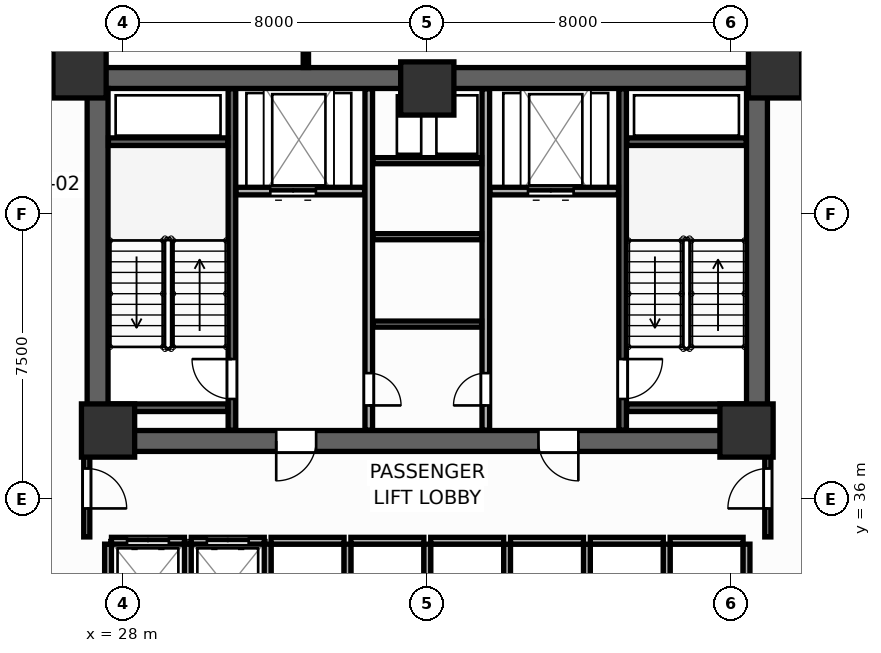
"""IFC4 building model, lengths in metres.
Left out: names, types, materials, properties, quantities, classifications, styles, units other than length and angle.
Written with IfcOpenShell. Run it as: python <this file> out.ifc"""

import sys

from ifc_helpers import new_model, si_unit, direction, frame, frame_2d, origin, origin_2d, place, context, subcontext, project, spatial, rectangle, extrude, source, transform, mapped, element, fill, save


model = new_model("IFC4")
c1 = context("Model", 3, precision=1e-05, world=origin(), true_north=direction((0.0, 1.0)))
c2 = subcontext(c1, "Body", "Model", "MODEL_VIEW")
j1 = project(units=[si_unit("LENGTHUNIT", "METRE"), si_unit("PLANEANGLEUNIT", "RADIAN")], contexts=[c1])
p1 = place(None, origin())
s1 = spatial("IfcSite", under=j1, at=p1, CompositionType="ELEMENT")
p2 = place(p1, origin())
s2 = spatial("IfcBuilding", under=s1, at=p2, CompositionType="ELEMENT")
p3 = place(p2, frame((0.0, 0.0, 51.3)))
s3 = spatial("IfcBuildingStorey", under=s2, at=p3, CompositionType="ELEMENT", Elevation=51.3)
p4 = place(p3, frame((27.05, 47.075, 0.0), z_axis=(0.0, 0.0, 1.0), x_axis=(1.0, 0.0, 0.0)))
e1 = element("IfcWall", 1, at=p4, inside=s3, PredefinedType="SHEAR", context=c2, shape_type="SweptSolid", body=[
    extrude(rectangle(XDim=17.9, YDim=0.55, at=frame_2d((8.95, 0.0))), origin(), (0.0, 0.0, 1.0), 3.9),
])
p5 = place(p3, frame((27.05, 37.525, 0.0), z_axis=(0.0, 0.0, 1.0), x_axis=(1.0, 0.0, 0.0)))
e2 = element("IfcWall", 2, at=p5, inside=s3, PredefinedType="SHEAR", context=c2, shape_type="SweptSolid", body=[
    extrude(rectangle(XDim=17.9, YDim=0.55, at=frame_2d((8.95, 0.0))), origin(), (0.0, 0.0, 1.0), 3.9),
])
p6 = place(p5, frame((4.975, 0.0, 0.0)))
e3 = element("IfcOpeningElement", 3, at=p6, cuts=e2, PredefinedType="OPENING", context=c2, shape_type="SweptSolid", body=[
    extrude(rectangle(XDim=1.05, YDim=2.1, at=frame_2d((0.525, 1.05))), frame((0.0, 0.285, 0.0), z_axis=(0.0, -1.0, 0.0), x_axis=(1.0, 0.0, 0.0)), (0.0, 0.0, 1.0), 0.57),
])
p7 = place(p5, frame((11.875, 0.0, 0.0)))
e4 = element("IfcOpeningElement", 4, at=p7, cuts=e2, PredefinedType="OPENING", context=c2, shape_type="SweptSolid", body=[
    extrude(rectangle(XDim=1.05, YDim=2.1, at=frame_2d((0.525, 1.05))), frame((0.0, 0.285, 0.0), z_axis=(0.0, -1.0, 0.0), x_axis=(1.0, 0.0, 0.0)), (0.0, 0.0, 1.0), 0.57),
])
for number, where, z_axis, x_axis in (
    (5, (27.325, 37.8, 0.0), (0.0, 0.0, 1.0), (0.0, 1.0, 0.0)),
    (6, (44.675, 37.8, 0.0), (0.0, 0.0, 1.0), (0.0, 1.0, 0.0)),
):
    element("IfcWall", number, at=place(p3, frame(where, z_axis=z_axis, x_axis=x_axis)), inside=s3, PredefinedType="SHEAR", context=c2, shape_type="SweptSolid", body=[
        extrude(rectangle(XDim=9.0, YDim=0.55, at=frame_2d((4.5, 0.0))), origin(), (0.0, 0.0, 1.0), 3.9),
    ])
m1 = source(origin(), c2, "Body", "SweptSolid", [
    extrude(rectangle(XDim=1.4, YDim=1.4, at=origin_2d()), origin(), (0.0, 0.0, 1.0), 3.9),
])
for number, where, z_axis, x_axis in (
    (7, (26.85, 47.25, 0.0), (0.0, 0.0, 1.0), (1.0, 0.0, 0.0)),
    (8, (45.15, 47.25, 0.0), (0.0, 0.0, 1.0), (1.0, 0.0, 0.0)),
    (9, (27.6, 37.8, 0.0), (0.0, 0.0, 1.0), (1.0, 0.0, 0.0)),
    (10, (44.4, 37.8, 0.0), (0.0, 0.0, 1.0), (1.0, 0.0, 0.0)),
    (11, (36.0, 46.8, 0.0), (0.0, 0.0, 1.0), (1.0, 0.0, 0.0)),
):
    element("IfcColumn", number, at=place(p3, frame(where, z_axis=z_axis, x_axis=x_axis)), inside=s3, PredefinedType="COLUMN", context=c2, shape_type="MappedRepresentation", body=[
        mapped(m1, transform((0.0, 0.0, 0.0), scale=1.0)),
    ])
p8 = place(p3, frame((30.86, 37.81, 0.0), z_axis=(0.0, 0.0, 1.0), x_axis=(0.0, 1.0, 0.0)))
e12 = element("IfcWall", 12, at=p8, inside=s3, PredefinedType="SHEAR", context=c2, shape_type="SweptSolid", body=[
    extrude(rectangle(XDim=8.98, YDim=0.2, at=frame_2d((4.49, 0.0))), origin(), (0.0, 0.0, 1.0), 3.9),
])
p9 = place(p8, frame((0.82, 0.0, 0.0)))
e13 = element("IfcOpeningElement", 13, at=p9, cuts=e12, PredefinedType="OPENING", context=c2, shape_type="SweptSolid", body=[
    extrude(rectangle(XDim=1.05, YDim=2.1, at=frame_2d((0.525, 1.05))), frame((0.0, 0.11, 0.0), z_axis=(0.0, -1.0, 0.0), x_axis=(1.0, 0.0, 0.0)), (0.0, 0.0, 1.0), 0.22),
])
for number, where, z_axis, x_axis in (
    (14, (27.61, 45.4, 0.0), (0.0, 0.0, 1.0), (1.0, 0.0, 0.0)),
    (15, (27.61, 38.4, 0.0), (0.0, 0.0, 1.0), (1.0, 0.0, 0.0)),
):
    element("IfcWall", number, at=place(p3, frame(where, z_axis=z_axis, x_axis=x_axis)), inside=s3, PredefinedType="SHEAR", context=c2, shape_type="SweptSolid", body=[
        extrude(rectangle(XDim=3.14, YDim=0.2, at=frame_2d((1.57, 0.0))), origin(), (0.0, 0.0, 1.0), 3.9),
    ])
p10 = place(p3, frame((41.14, 37.81, 0.0), z_axis=(0.0, 0.0, 1.0), x_axis=(0.0, 1.0, 0.0)))
e16 = element("IfcWall", 16, at=p10, inside=s3, PredefinedType="SHEAR", context=c2, shape_type="SweptSolid", body=[
    extrude(rectangle(XDim=8.98, YDim=0.2, at=frame_2d((4.49, 0.0))), origin(), (0.0, 0.0, 1.0), 3.9),
])
p11 = place(p10, frame((0.82, 0.0, 0.0)))
e17 = element("IfcOpeningElement", 17, at=p11, cuts=e16, PredefinedType="OPENING", context=c2, shape_type="SweptSolid", body=[
    extrude(rectangle(XDim=1.05, YDim=2.1, at=frame_2d((0.525, 1.05))), frame((0.0, 0.11, 0.0), z_axis=(0.0, -1.0, 0.0), x_axis=(1.0, 0.0, 0.0)), (0.0, 0.0, 1.0), 0.22),
])
for number, where, z_axis, x_axis in (
    (18, (41.25, 45.4, 0.0), (0.0, 0.0, 1.0), (1.0, 0.0, 0.0)),
    (19, (41.25, 38.4, 0.0), (0.0, 0.0, 1.0), (1.0, 0.0, 0.0)),
):
    element("IfcWall", number, at=place(p3, frame(where, z_axis=z_axis, x_axis=x_axis)), inside=s3, PredefinedType="SHEAR", context=c2, shape_type="SweptSolid", body=[
        extrude(rectangle(XDim=3.14, YDim=0.2, at=frame_2d((1.57, 0.0))), origin(), (0.0, 0.0, 1.0), 3.9),
    ])
p12 = place(p3, frame((30.97, 44.1, 0.0), z_axis=(0.0, 0.0, 1.0), x_axis=(1.0, 0.0, 0.0)))
e20 = element("IfcWall", 20, at=p12, inside=s3, PredefinedType="PARTITIONING", context=c2, shape_type="SweptSolid", body=[
    extrude(rectangle(XDim=3.38, YDim=0.2, at=frame_2d((1.69, 0.0))), origin(), (0.0, 0.0, 1.0), 3.68),
])
p13 = place(p12, frame((0.9, 0.0, 0.0)))
e21 = element("IfcOpeningElement", 21, at=p13, cuts=e20, PredefinedType="OPENING", context=c2, shape_type="SweptSolid", body=[
    extrude(rectangle(XDim=1.2, YDim=2.1, at=frame_2d((0.6, 1.05))), frame((0.0, 0.11, 0.0), z_axis=(0.0, -1.0, 0.0), x_axis=(1.0, 0.0, 0.0)), (0.0, 0.0, 1.0), 0.22),
])
p14 = place(p3, frame((37.65, 44.1, 0.0), z_axis=(0.0, 0.0, 1.0), x_axis=(1.0, 0.0, 0.0)))
e22 = element("IfcWall", 22, at=p14, inside=s3, PredefinedType="PARTITIONING", context=c2, shape_type="SweptSolid", body=[
    extrude(rectangle(XDim=3.38, YDim=0.2, at=frame_2d((1.69, 0.0))), origin(), (0.0, 0.0, 1.0), 3.68),
])
p15 = place(p14, frame((1.0, 0.0, 0.0)))
e23 = element("IfcOpeningElement", 23, at=p15, cuts=e22, PredefinedType="OPENING", context=c2, shape_type="SweptSolid", body=[
    extrude(rectangle(XDim=1.2, YDim=2.1, at=frame_2d((0.6, 1.05))), frame((0.0, 0.11, 0.0), z_axis=(0.0, -1.0, 0.0), x_axis=(1.0, 0.0, 0.0)), (0.0, 0.0, 1.0), 0.22),
])
p16 = place(p3, frame((34.46, 37.81, 0.0), z_axis=(0.0, 0.0, 1.0), x_axis=(0.0, 1.0, 0.0)))
e24 = element("IfcWall", 24, at=p16, inside=s3, PredefinedType="PARTITIONING", context=c2, shape_type="SweptSolid", body=[
    extrude(rectangle(XDim=8.98, YDim=0.2, at=frame_2d((4.49, 0.0))), origin(), (0.0, 0.0, 1.0), 3.68),
])
p17 = place(p16, frame((0.65, 0.0, 0.0)))
e25 = element("IfcOpeningElement", 25, at=p17, cuts=e24, PredefinedType="OPENING", context=c2, shape_type="SweptSolid", body=[
    extrude(rectangle(XDim=0.85, YDim=2.05, at=frame_2d((0.425, 1.025))), frame((0.0, 0.11, 0.0), z_axis=(0.0, -1.0, 0.0), x_axis=(1.0, 0.0, 0.0)), (0.0, 0.0, 1.0), 0.22),
])
p18 = place(p3, frame((37.54, 37.81, 0.0), z_axis=(0.0, 0.0, 1.0), x_axis=(0.0, 1.0, 0.0)))
e26 = element("IfcWall", 26, at=p18, inside=s3, PredefinedType="PARTITIONING", context=c2, shape_type="SweptSolid", body=[
    extrude(rectangle(XDim=8.98, YDim=0.2, at=frame_2d((4.49, 0.0))), origin(), (0.0, 0.0, 1.0), 3.68),
])
p19 = place(p18, frame((0.65, 0.0, 0.0)))
e27 = element("IfcOpeningElement", 27, at=p19, cuts=e26, PredefinedType="OPENING", context=c2, shape_type="SweptSolid", body=[
    extrude(rectangle(XDim=0.85, YDim=2.05, at=frame_2d((0.425, 1.025))), frame((0.0, 0.11, 0.0), z_axis=(0.0, -1.0, 0.0), x_axis=(1.0, 0.0, 0.0)), (0.0, 0.0, 1.0), 0.22),
])
for number, where, z_axis, x_axis in (
    (28, (34.57, 40.6, 0.0), (0.0, 0.0, 1.0), (1.0, 0.0, 0.0)),
    (29, (34.57, 42.9, 0.0), (0.0, 0.0, 1.0), (1.0, 0.0, 0.0)),
    (30, (34.57, 44.9, 0.0), (0.0, 0.0, 1.0), (1.0, 0.0, 0.0)),
):
    element("IfcWall", number, at=place(p3, frame(where, z_axis=z_axis, x_axis=x_axis)), inside=s3, PredefinedType="PARTITIONING", context=c2, shape_type="SweptSolid", body=[
        extrude(rectangle(XDim=2.86, YDim=0.16, at=frame_2d((1.43, 0.0))), origin(), (0.0, 0.0, 1.0), 3.68),
    ])
p20 = place(p3, frame((27.69, 34.9, 0.0), z_axis=(0.0, 0.0, 1.0), x_axis=(1.0, 0.0, 0.0)))
e31 = element("IfcWall", 31, at=p20, inside=s3, PredefinedType="PARTITIONING", context=c2, shape_type="SweptSolid", body=[
    extrude(rectangle(XDim=1.92, YDim=0.18, at=frame_2d((0.96, 0.0))), origin(), (0.0, 0.0, 1.0), 3.68),
])
p21 = place(p20, frame((0.41, 0.0, 0.0)))
e32 = element("IfcOpeningElement", 32, at=p21, cuts=e31, PredefinedType="OPENING", context=c2, shape_type="SweptSolid", body=[
    extrude(rectangle(XDim=1.1, YDim=2.1, at=frame_2d((0.55, 1.05))), frame((0.0, 0.1, 0.0), z_axis=(0.0, -1.0, 0.0), x_axis=(1.0, 0.0, 0.0)), (0.0, 0.0, 1.0), 0.2),
])
p22 = place(p3, frame((27.6, 32.49, 0.0), z_axis=(0.0, 0.0, 1.0), x_axis=(0.0, 1.0, 0.0)))
e33 = element("IfcWall", 33, at=p22, inside=s3, PredefinedType="PARTITIONING", context=c2, shape_type="SweptSolid", body=[
    extrude(rectangle(XDim=2.32, YDim=0.18, at=frame_2d((1.16, 0.0))), origin(), (0.0, 0.0, 1.0), 3.68),
])
p23 = place(p3, frame((29.79, 34.9, 0.0), z_axis=(0.0, 0.0, 1.0), x_axis=(1.0, 0.0, 0.0)))
e34 = element("IfcWall", 34, at=p23, inside=s3, PredefinedType="PARTITIONING", context=c2, shape_type="SweptSolid", body=[
    extrude(rectangle(XDim=1.92, YDim=0.18, at=frame_2d((0.96, 0.0))), origin(), (0.0, 0.0, 1.0), 3.68),
])
p24 = place(p23, frame((0.41, 0.0, 0.0)))
e35 = element("IfcOpeningElement", 35, at=p24, cuts=e34, PredefinedType="OPENING", context=c2, shape_type="SweptSolid", body=[
    extrude(rectangle(XDim=1.1, YDim=2.1, at=frame_2d((0.55, 1.05))), frame((0.0, 0.1, 0.0), z_axis=(0.0, -1.0, 0.0), x_axis=(1.0, 0.0, 0.0)), (0.0, 0.0, 1.0), 0.2),
])
p25 = place(p3, frame((29.7, 32.49, 0.0), z_axis=(0.0, 0.0, 1.0), x_axis=(0.0, 1.0, 0.0)))
e36 = element("IfcWall", 36, at=p25, inside=s3, PredefinedType="PARTITIONING", context=c2, shape_type="SweptSolid", body=[
    extrude(rectangle(XDim=2.32, YDim=0.18, at=frame_2d((1.16, 0.0))), origin(), (0.0, 0.0, 1.0), 3.68),
])
p26 = place(p3, frame((31.89, 34.9, 0.0), z_axis=(0.0, 0.0, 1.0), x_axis=(1.0, 0.0, 0.0)))
e37 = element("IfcWall", 37, at=p26, inside=s3, PredefinedType="PARTITIONING", context=c2, shape_type="SweptSolid", body=[
    extrude(rectangle(XDim=1.92, YDim=0.18, at=frame_2d((0.96, 0.0))), origin(), (0.0, 0.0, 1.0), 3.68),
])
p27 = place(p3, frame((31.8, 32.49, 0.0), z_axis=(0.0, 0.0, 1.0), x_axis=(0.0, 1.0, 0.0)))
e38 = element("IfcWall", 38, at=p27, inside=s3, PredefinedType="PARTITIONING", context=c2, shape_type="SweptSolid", body=[
    extrude(rectangle(XDim=2.32, YDim=0.18, at=frame_2d((1.16, 0.0))), origin(), (0.0, 0.0, 1.0), 3.68),
])
p28 = place(p3, frame((33.99, 34.9, 0.0), z_axis=(0.0, 0.0, 1.0), x_axis=(1.0, 0.0, 0.0)))
e39 = element("IfcWall", 39, at=p28, inside=s3, PredefinedType="PARTITIONING", context=c2, shape_type="SweptSolid", body=[
    extrude(rectangle(XDim=1.92, YDim=0.18, at=frame_2d((0.96, 0.0))), origin(), (0.0, 0.0, 1.0), 3.68),
])
p29 = place(p3, frame((33.9, 32.49, 0.0), z_axis=(0.0, 0.0, 1.0), x_axis=(0.0, 1.0, 0.0)))
e40 = element("IfcWall", 40, at=p29, inside=s3, PredefinedType="PARTITIONING", context=c2, shape_type="SweptSolid", body=[
    extrude(rectangle(XDim=2.32, YDim=0.18, at=frame_2d((1.16, 0.0))), origin(), (0.0, 0.0, 1.0), 3.68),
])
p30 = place(p3, frame((36.09, 34.9, 0.0), z_axis=(0.0, 0.0, 1.0), x_axis=(1.0, 0.0, 0.0)))
e41 = element("IfcWall", 41, at=p30, inside=s3, PredefinedType="PARTITIONING", context=c2, shape_type="SweptSolid", body=[
    extrude(rectangle(XDim=1.92, YDim=0.18, at=frame_2d((0.96, 0.0))), origin(), (0.0, 0.0, 1.0), 3.68),
])
p31 = place(p3, frame((36.0, 32.49, 0.0), z_axis=(0.0, 0.0, 1.0), x_axis=(0.0, 1.0, 0.0)))
e42 = element("IfcWall", 42, at=p31, inside=s3, PredefinedType="PARTITIONING", context=c2, shape_type="SweptSolid", body=[
    extrude(rectangle(XDim=2.32, YDim=0.18, at=frame_2d((1.16, 0.0))), origin(), (0.0, 0.0, 1.0), 3.68),
])
p32 = place(p3, frame((38.19, 34.9, 0.0), z_axis=(0.0, 0.0, 1.0), x_axis=(1.0, 0.0, 0.0)))
e43 = element("IfcWall", 43, at=p32, inside=s3, PredefinedType="PARTITIONING", context=c2, shape_type="SweptSolid", body=[
    extrude(rectangle(XDim=1.92, YDim=0.18, at=frame_2d((0.96, 0.0))), origin(), (0.0, 0.0, 1.0), 3.68),
])
p33 = place(p3, frame((38.1, 32.49, 0.0), z_axis=(0.0, 0.0, 1.0), x_axis=(0.0, 1.0, 0.0)))
e44 = element("IfcWall", 44, at=p33, inside=s3, PredefinedType="PARTITIONING", context=c2, shape_type="SweptSolid", body=[
    extrude(rectangle(XDim=2.32, YDim=0.18, at=frame_2d((1.16, 0.0))), origin(), (0.0, 0.0, 1.0), 3.68),
])
p34 = place(p3, frame((40.29, 34.9, 0.0), z_axis=(0.0, 0.0, 1.0), x_axis=(1.0, 0.0, 0.0)))
e45 = element("IfcWall", 45, at=p34, inside=s3, PredefinedType="PARTITIONING", context=c2, shape_type="SweptSolid", body=[
    extrude(rectangle(XDim=1.92, YDim=0.18, at=frame_2d((0.96, 0.0))), origin(), (0.0, 0.0, 1.0), 3.68),
])
p35 = place(p3, frame((40.2, 32.49, 0.0), z_axis=(0.0, 0.0, 1.0), x_axis=(0.0, 1.0, 0.0)))
e46 = element("IfcWall", 46, at=p35, inside=s3, PredefinedType="PARTITIONING", context=c2, shape_type="SweptSolid", body=[
    extrude(rectangle(XDim=2.32, YDim=0.18, at=frame_2d((1.16, 0.0))), origin(), (0.0, 0.0, 1.0), 3.68),
])
p36 = place(p3, frame((42.39, 34.9, 0.0), z_axis=(0.0, 0.0, 1.0), x_axis=(1.0, 0.0, 0.0)))
e47 = element("IfcWall", 47, at=p36, inside=s3, PredefinedType="PARTITIONING", context=c2, shape_type="SweptSolid", body=[
    extrude(rectangle(XDim=1.92, YDim=0.18, at=frame_2d((0.96, 0.0))), origin(), (0.0, 0.0, 1.0), 3.68),
])
for number, where, z_axis, x_axis in (
    (48, (42.3, 32.49, 0.0), (0.0, 0.0, 1.0), (0.0, 1.0, 0.0)),
    (49, (44.4, 32.49, 0.0), (0.0, 0.0, 1.0), (0.0, 1.0, 0.0)),
):
    element("IfcWall", number, at=place(p3, frame(where, z_axis=z_axis, x_axis=x_axis)), inside=s3, PredefinedType="PARTITIONING", context=c2, shape_type="SweptSolid", body=[
        extrude(rectangle(XDim=2.32, YDim=0.18, at=frame_2d((1.16, 0.0))), origin(), (0.0, 0.0, 1.0), 3.68),
    ])
p37 = place(p3, frame((27.04, 35.0, 0.0), z_axis=(0.0, 0.0, 1.0), x_axis=(0.0, 1.0, 0.0)))
e50 = element("IfcWall", 50, at=p37, inside=s3, PredefinedType="PARTITIONING", context=c2, shape_type="SweptSolid", body=[
    extrude(rectangle(XDim=2.65, YDim=0.16, at=frame_2d((1.325, 0.0))), origin(), (0.0, 0.0, 1.0), 3.68),
])
p38 = place(p37, frame((0.75, 0.0, 0.0)))
e51 = element("IfcOpeningElement", 51, at=p38, cuts=e50, PredefinedType="OPENING", context=c2, shape_type="SweptSolid", body=[
    extrude(rectangle(XDim=1.05, YDim=2.1, at=frame_2d((0.525, 1.05))), frame((0.0, 0.09, 0.0), z_axis=(0.0, -1.0, 0.0), x_axis=(1.0, 0.0, 0.0)), (0.0, 0.0, 1.0), 0.18),
])
p39 = place(p3, frame((44.96, 35.0, 0.0), z_axis=(0.0, 0.0, 1.0), x_axis=(0.0, 1.0, 0.0)))
e52 = element("IfcWall", 52, at=p39, inside=s3, PredefinedType="PARTITIONING", context=c2, shape_type="SweptSolid", body=[
    extrude(rectangle(XDim=2.65, YDim=0.16, at=frame_2d((1.325, 0.0))), origin(), (0.0, 0.0, 1.0), 3.68),
])
p40 = place(p39, frame((0.75, 0.0, 0.0)))
e53 = element("IfcOpeningElement", 53, at=p40, cuts=e52, PredefinedType="OPENING", context=c2, shape_type="SweptSolid", body=[
    extrude(rectangle(XDim=1.05, YDim=2.1, at=frame_2d((0.525, 1.05))), frame((0.0, 0.09, 0.0), z_axis=(0.0, -1.0, 0.0), x_axis=(1.0, 0.0, 0.0)), (0.0, 0.0, 1.0), 0.18),
])
p41 = place(p3, frame((44.965, 47.18, 0.0), z_axis=(0.0, 0.0, 1.0), x_axis=(0.0, 1.0, 0.0)))
e54 = element("IfcWall", 54, at=p41, inside=s3, PredefinedType="PARTITIONING", context=c2, shape_type="SweptSolid", body=[
    extrude(rectangle(XDim=9.492, YDim=0.16, at=frame_2d((4.746, 0.0))), origin(), (0.0, 0.0, 1.0), 3.18),
])
p42 = place(p3, frame((27.035, 47.34, 0.0), z_axis=(0.0, 0.0, 1.0), x_axis=(0.0, 1.0, 0.0)))
e55 = element("IfcWall", 55, at=p42, inside=s3, PredefinedType="PARTITIONING", context=c2, shape_type="SweptSolid", body=[
    extrude(rectangle(XDim=9.332, YDim=0.16, at=frame_2d((4.666, 0.0))), origin(), (0.0, 0.0, 1.0), 3.18),
])
p43 = place(p42, frame((4.086, 0.0, 0.0)))
e56 = element("IfcOpeningElement", 56, at=p43, cuts=e55, PredefinedType="OPENING", context=c2, shape_type="SweptSolid", body=[
    extrude(rectangle(XDim=0.95, YDim=2.05, at=frame_2d((0.475, 1.025))), frame((0.0, 0.09, 0.0), z_axis=(0.0, -1.0, 0.0), x_axis=(1.0, 0.0, 0.0)), (0.0, 0.0, 1.0), 0.18),
])
p44 = place(p3, frame((32.805, 47.352, 0.0), z_axis=(0.0, 0.0, 1.0), x_axis=(0.0, 1.0, 0.0)))
e57 = element("IfcWall", 57, at=p44, inside=s3, PredefinedType="PARTITIONING", context=c2, shape_type="SweptSolid", body=[
    extrude(rectangle(XDim=9.517, YDim=0.14, at=frame_2d((4.759, 0.0))), origin(), (0.0, 0.0, 1.0), 3.68),
])
p45 = place(p44, frame((4.284, 0.0, 0.0)))
e58 = element("IfcOpeningElement", 58, at=p45, cuts=e57, PredefinedType="OPENING", context=c2, shape_type="SweptSolid", body=[
    extrude(rectangle(XDim=0.95, YDim=2.05, at=frame_2d((0.475, 1.025))), frame((0.0, 0.08, 0.0), z_axis=(0.0, -1.0, 0.0), x_axis=(1.0, 0.0, 0.0)), (0.0, 0.0, 1.0), 0.16),
])
p46 = place(p9, origin())
e59 = element("IfcDoor", 59, at=p46, inside=s3, OperationType="SINGLE_SWING_RIGHT", PredefinedType="DOOR", context=c2, shape_type="SweptSolid", body=[
    extrude(rectangle(XDim=1.05, YDim=2.1, at=frame_2d((0.525, 1.05))), frame((0.0, 0.025, 0.0), z_axis=(0.0, -1.0, 0.0), x_axis=(1.0, 0.0, 0.0)), (0.0, 0.0, 1.0), 0.05),
])
fill(e13, e59)
p47 = place(p11, frame((1.05, 0.0, 0.0), z_axis=(0.0, 0.0, 1.0), x_axis=(-1.0, 0.0, 0.0)))
e60 = element("IfcDoor", 60, at=p47, inside=s3, OperationType="SINGLE_SWING_LEFT", PredefinedType="DOOR", context=c2, shape_type="SweptSolid", body=[
    extrude(rectangle(XDim=1.05, YDim=2.1, at=frame_2d((0.525, 1.05))), frame((0.0, 0.025, 0.0), z_axis=(0.0, -1.0, 0.0), x_axis=(1.0, 0.0, 0.0)), (0.0, 0.0, 1.0), 0.05),
])
fill(e17, e60)
p48 = place(p13, origin())
e61 = element("IfcDoor", 61, at=p48, inside=s3, OperationType="DOUBLE_DOOR_SLIDING", PredefinedType="DOOR", context=c2, shape_type="SweptSolid", body=[
    extrude(rectangle(XDim=1.2, YDim=2.1, at=frame_2d((0.6, 1.05))), frame((0.0, 0.025, 0.0), z_axis=(0.0, -1.0, 0.0), x_axis=(1.0, 0.0, 0.0)), (0.0, 0.0, 1.0), 0.05),
])
fill(e21, e61)
p49 = place(p15, origin())
e62 = element("IfcDoor", 62, at=p49, inside=s3, OperationType="DOUBLE_DOOR_SLIDING", PredefinedType="DOOR", context=c2, shape_type="SweptSolid", body=[
    extrude(rectangle(XDim=1.2, YDim=2.1, at=frame_2d((0.6, 1.05))), frame((0.0, 0.025, 0.0), z_axis=(0.0, -1.0, 0.0), x_axis=(1.0, 0.0, 0.0)), (0.0, 0.0, 1.0), 0.05),
])
fill(e23, e62)
p50 = place(p17, frame((0.85, 0.0, 0.0), z_axis=(0.0, 0.0, 1.0), x_axis=(-1.0, 0.0, 0.0)))
e63 = element("IfcDoor", 63, at=p50, inside=s3, OperationType="SINGLE_SWING_RIGHT", PredefinedType="DOOR", context=c2, shape_type="SweptSolid", body=[
    extrude(rectangle(XDim=0.85, YDim=2.05, at=frame_2d((0.425, 1.025))), frame((0.0, 0.025, 0.0), z_axis=(0.0, -1.0, 0.0), x_axis=(1.0, 0.0, 0.0)), (0.0, 0.0, 1.0), 0.05),
])
fill(e25, e63)
p51 = place(p19, origin())
e64 = element("IfcDoor", 64, at=p51, inside=s3, OperationType="SINGLE_SWING_LEFT", PredefinedType="DOOR", context=c2, shape_type="SweptSolid", body=[
    extrude(rectangle(XDim=0.85, YDim=2.05, at=frame_2d((0.425, 1.025))), frame((0.0, 0.025, 0.0), z_axis=(0.0, -1.0, 0.0), x_axis=(1.0, 0.0, 0.0)), (0.0, 0.0, 1.0), 0.05),
])
fill(e27, e64)
p52 = place(p21, origin())
e65 = element("IfcDoor", 65, at=p52, inside=s3, OperationType="DOUBLE_DOOR_SLIDING", PredefinedType="DOOR", context=c2, shape_type="SweptSolid", body=[
    extrude(rectangle(XDim=1.1, YDim=2.1, at=frame_2d((0.55, 1.05))), frame((0.0, 0.025, 0.0), z_axis=(0.0, -1.0, 0.0), x_axis=(1.0, 0.0, 0.0)), (0.0, 0.0, 1.0), 0.05),
])
fill(e32, e65)
p53 = place(p24, origin())
e66 = element("IfcDoor", 66, at=p53, inside=s3, OperationType="DOUBLE_DOOR_SLIDING", PredefinedType="DOOR", context=c2, shape_type="SweptSolid", body=[
    extrude(rectangle(XDim=1.1, YDim=2.1, at=frame_2d((0.55, 1.05))), frame((0.0, 0.025, 0.0), z_axis=(0.0, -1.0, 0.0), x_axis=(1.0, 0.0, 0.0)), (0.0, 0.0, 1.0), 0.05),
])
fill(e35, e66)
p54 = place(p38, frame((1.05, 0.0, 0.0), z_axis=(0.0, 0.0, 1.0), x_axis=(-1.0, 0.0, 0.0)))
e67 = element("IfcDoor", 67, at=p54, inside=s3, OperationType="SINGLE_SWING_RIGHT", PredefinedType="DOOR", context=c2, shape_type="SweptSolid", body=[
    extrude(rectangle(XDim=1.05, YDim=2.1, at=frame_2d((0.525, 1.05))), frame((0.0, 0.025, 0.0), z_axis=(0.0, -1.0, 0.0), x_axis=(1.0, 0.0, 0.0)), (0.0, 0.0, 1.0), 0.05),
])
fill(e51, e67)
p55 = place(p40, origin())
e68 = element("IfcDoor", 68, at=p55, inside=s3, OperationType="SINGLE_SWING_LEFT", PredefinedType="DOOR", context=c2, shape_type="SweptSolid", body=[
    extrude(rectangle(XDim=1.05, YDim=2.1, at=frame_2d((0.525, 1.05))), frame((0.0, 0.025, 0.0), z_axis=(0.0, -1.0, 0.0), x_axis=(1.0, 0.0, 0.0)), (0.0, 0.0, 1.0), 0.05),
])
fill(e53, e68)
p56 = place(p6, frame((1.05, 0.0, 0.0), z_axis=(0.0, 0.0, 1.0), x_axis=(-1.0, 0.0, 0.0)))
e69 = element("IfcDoor", 69, at=p56, inside=s3, OperationType="SINGLE_SWING_RIGHT", PredefinedType="DOOR", context=c2, shape_type="SweptSolid", body=[
    extrude(rectangle(XDim=1.05, YDim=2.1, at=frame_2d((0.525, 1.05))), frame((0.0, 0.025, 0.0), z_axis=(0.0, -1.0, 0.0), x_axis=(1.0, 0.0, 0.0)), (0.0, 0.0, 1.0), 0.05),
])
fill(e3, e69)
p57 = place(p7, frame((1.05, 0.0, 0.0), z_axis=(0.0, 0.0, 1.0), x_axis=(-1.0, 0.0, 0.0)))
e70 = element("IfcDoor", 70, at=p57, inside=s3, OperationType="SINGLE_SWING_LEFT", PredefinedType="DOOR", context=c2, shape_type="SweptSolid", body=[
    extrude(rectangle(XDim=1.05, YDim=2.1, at=frame_2d((0.525, 1.05))), frame((0.0, 0.025, 0.0), z_axis=(0.0, -1.0, 0.0), x_axis=(1.0, 0.0, 0.0)), (0.0, 0.0, 1.0), 0.05),
])
fill(e4, e70)
save(model, sys.argv[1])
